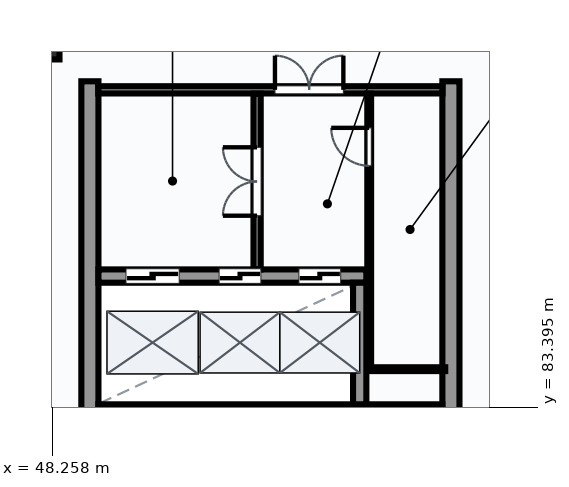
"""IFC4 building model, lengths in metres.
Left out: names, types, materials, properties, quantities, classifications, styles, units other than length and angle.
Written with IfcOpenShell. Run it as: python <this file> out.ifc"""

import sys

from ifc_helpers import new_model, si_unit, direction, frame, frame_2d, origin, origin_2d, place, context, subcontext, project, spatial, rectangle, extrude, element, fill, save


model = new_model("IFC4")
c1 = context("Model", 3, precision=1e-05, world=origin(), true_north=direction((0.0, 1.0)))
c2 = subcontext(c1, "Body", "Model", "MODEL_VIEW")
j1 = project(units=[si_unit("LENGTHUNIT", "METRE"), si_unit("PLANEANGLEUNIT", "RADIAN")], contexts=[c1])
p1 = place(None, origin())
s1 = spatial("IfcSite", under=j1, at=p1, CompositionType="ELEMENT")
p2 = place(p1, origin())
s2 = spatial("IfcBuilding", under=s1, at=p2, CompositionType="ELEMENT")
p3 = place(p2, frame((0.0, 0.0, 24.6)))
s3 = spatial("IfcBuildingStorey", under=s2, at=p3, CompositionType="ELEMENT", Elevation=24.6)
p4 = place(p3, frame((48.0, 93.0, 0.0), z_axis=(0.0, 0.0, 1.0), x_axis=(1.0, 0.0, 0.0)))
e1 = element("IfcColumn", 1, at=p4, inside=s3, PredefinedType="COLUMN", context=c2, shape_type="SweptSolid", body=[
    extrude(rectangle(XDim=0.9, YDim=0.9, at=origin_2d()), origin(), (0.0, 0.0, 1.0), 4.8),
])
for number, where, z_axis, x_axis in (
    (2, (49.25, 83.025, 0.0), (0.0, 0.0, 1.0), (0.0, 1.0, 0.0)),
    (3, (58.75, 83.025, 0.0), (0.0, 0.0, 1.0), (0.0, 1.0, 0.0)),
):
    element("IfcWall", number, at=place(p3, frame(where, z_axis=z_axis, x_axis=x_axis)), inside=s3, PredefinedType="SHEAR", context=c2, shape_type="SweptSolid", body=[
        extrude(rectangle(XDim=8.95, YDim=0.45, at=frame_2d((4.475, 0.0))), origin(), (0.0, 0.0, 1.0), 4.8),
    ])
p5 = place(p3, frame((49.475, 83.25, 0.0), z_axis=(0.0, 0.0, 1.0), x_axis=(1.0, 0.0, 0.0)))
e4 = element("IfcWall", 4, at=p5, inside=s3, PredefinedType="SHEAR", context=c2, shape_type="SweptSolid", body=[
    extrude(rectangle(XDim=9.05, YDim=0.45, at=frame_2d((4.525, 0.0))), origin(), (0.0, 0.0, 1.0), 4.8),
])
p6 = place(p3, frame((49.475, 86.85, 0.0), z_axis=(0.0, 0.0, 1.0), x_axis=(1.0, 0.0, 0.0)))
e5 = element("IfcWall", 5, at=p6, inside=s3, PredefinedType="SHEAR", context=c2, shape_type="SweptSolid", body=[
    extrude(rectangle(XDim=7.05, YDim=0.35, at=frame_2d((3.525, 0.0))), origin(), (0.0, 0.0, 1.0), 4.8),
])
p7 = place(p6, frame((0.725, 0.0, 0.0)))
e6 = element("IfcOpeningElement", 6, at=p7, cuts=e5, PredefinedType="OPENING", context=c2, shape_type="SweptSolid", body=[
    extrude(rectangle(XDim=1.4, YDim=2.3, at=frame_2d((0.7, 1.15))), frame((0.0, 0.185, 0.0), z_axis=(0.0, -1.0, 0.0), x_axis=(1.0, 0.0, 0.0)), (0.0, 0.0, 1.0), 0.37),
])
p8 = place(p6, frame((3.175, 0.0, 0.0)))
e7 = element("IfcOpeningElement", 7, at=p8, cuts=e5, PredefinedType="OPENING", context=c2, shape_type="SweptSolid", body=[
    extrude(rectangle(XDim=1.1, YDim=2.2, at=frame_2d((0.55, 1.1))), frame((0.0, 0.185, 0.0), z_axis=(0.0, -1.0, 0.0), x_axis=(1.0, 0.0, 0.0)), (0.0, 0.0, 1.0), 0.37),
])
p9 = place(p6, frame((5.275, 0.0, 0.0)))
e8 = element("IfcOpeningElement", 8, at=p9, cuts=e5, PredefinedType="OPENING", context=c2, shape_type="SweptSolid", body=[
    extrude(rectangle(XDim=1.1, YDim=2.2, at=frame_2d((0.55, 1.1))), frame((0.0, 0.185, 0.0), z_axis=(0.0, -1.0, 0.0), x_axis=(1.0, 0.0, 0.0)), (0.0, 0.0, 1.0), 0.37),
])
p10 = place(p3, frame((56.35, 83.475, 0.0), z_axis=(0.0, 0.0, 1.0), x_axis=(0.0, 1.0, 0.0)))
e9 = element("IfcWall", 9, at=p10, inside=s3, PredefinedType="SHEAR", context=c2, shape_type="SweptSolid", body=[
    extrude(rectangle(XDim=3.2, YDim=0.35, at=frame_2d((1.6, 0.0))), origin(), (0.0, 0.0, 1.0), 4.8),
])
p11 = place(p3, frame((49.47, 91.75, 0.0), z_axis=(0.0, 0.0, 1.0), x_axis=(1.0, 0.0, 0.0)))
e10 = element("IfcWall", 10, at=p11, inside=s3, PredefinedType="PARTITIONING", context=c2, shape_type="SweptSolid", body=[
    extrude(rectangle(XDim=9.06, YDim=0.19, at=frame_2d((4.53, 0.0))), origin(), (0.0, 0.0, 1.0), 4.58),
])
p12 = place(p11, frame((4.65, 0.0, 0.0)))
e11 = element("IfcOpeningElement", 11, at=p12, cuts=e10, PredefinedType="OPENING", context=c2, shape_type="SweptSolid", body=[
    extrude(rectangle(XDim=1.8, YDim=2.3, at=frame_2d((0.9, 1.15))), frame((0.0, 0.105, 0.0), z_axis=(0.0, -1.0, 0.0), x_axis=(1.0, 0.0, 0.0)), (0.0, 0.0, 1.0), 0.21),
])
p13 = place(p3, frame((53.65, 87.025, 0.0), z_axis=(0.0, 0.0, 1.0), x_axis=(0.0, 1.0, 0.0)))
e12 = element("IfcWall", 12, at=p13, inside=s3, PredefinedType="PARTITIONING", context=c2, shape_type="SweptSolid", body=[
    extrude(rectangle(XDim=4.625, YDim=0.19, at=frame_2d((2.312, 0.0))), origin(), (0.0, 0.0, 1.0), 4.58),
])
p14 = place(p13, frame((1.413, 0.0, 0.0)))
e13 = element("IfcOpeningElement", 13, at=p14, cuts=e12, PredefinedType="OPENING", context=c2, shape_type="SweptSolid", body=[
    extrude(rectangle(XDim=1.8, YDim=2.2, at=frame_2d((0.9, 1.1))), frame((0.0, 0.105, 0.0), z_axis=(0.0, -1.0, 0.0), x_axis=(1.0, 0.0, 0.0)), (0.0, 0.0, 1.0), 0.21),
])
p15 = place(p3, frame((56.6, 84.4, 0.0), z_axis=(0.0, 0.0, 1.0), x_axis=(0.0, 1.0, 0.0)))
e14 = element("IfcWall", 14, at=p15, inside=s3, PredefinedType="PARTITIONING", context=c2, shape_type="SweptSolid", body=[
    extrude(rectangle(XDim=7.25, YDim=0.1, at=frame_2d((3.625, 0.0))), origin(), (0.0, 0.0, 1.0), 4.58),
])
p16 = place(p15, frame((5.35, 0.0, 0.0)))
e15 = element("IfcOpeningElement", 15, at=p16, cuts=e14, PredefinedType="OPENING", context=c2, shape_type="SweptSolid", body=[
    extrude(rectangle(XDim=1.0, YDim=2.1, at=frame_2d((0.5, 1.05))), frame((0.0, 0.06, 0.0), z_axis=(0.0, -1.0, 0.0), x_axis=(1.0, 0.0, 0.0)), (0.0, 0.0, 1.0), 0.12),
])
p17 = place(p3, frame((56.6, 84.4, 0.0), z_axis=(0.0, 0.0, 1.0), x_axis=(1.0, 0.0, 0.0)))
e16 = element("IfcWall", 16, at=p17, inside=s3, PredefinedType="PARTITIONING", context=c2, shape_type="SweptSolid", body=[
    extrude(rectangle(XDim=2.0, YDim=0.1, at=frame_2d((1.0, 0.0))), origin(), (0.0, 0.0, 1.0), 4.58),
])
p18 = place(p7, origin())
e17 = element("IfcDoor", 17, at=p18, inside=s3, OperationType="SLIDING_TO_LEFT", PredefinedType="DOOR", context=c2, shape_type="SweptSolid", body=[
    extrude(rectangle(XDim=1.4, YDim=2.3, at=frame_2d((0.7, 1.15))), frame((0.0, 0.025, 0.0), z_axis=(0.0, -1.0, 0.0), x_axis=(1.0, 0.0, 0.0)), (0.0, 0.0, 1.0), 0.05),
])
fill(e6, e17)
p19 = place(p8, origin())
e18 = element("IfcDoor", 18, at=p19, inside=s3, OperationType="SLIDING_TO_LEFT", PredefinedType="DOOR", context=c2, shape_type="SweptSolid", body=[
    extrude(rectangle(XDim=1.1, YDim=2.2, at=frame_2d((0.55, 1.1))), frame((0.0, 0.025, 0.0), z_axis=(0.0, -1.0, 0.0), x_axis=(1.0, 0.0, 0.0)), (0.0, 0.0, 1.0), 0.05),
])
fill(e7, e18)
p20 = place(p9, origin())
e19 = element("IfcDoor", 19, at=p20, inside=s3, OperationType="SLIDING_TO_LEFT", PredefinedType="DOOR", context=c2, shape_type="SweptSolid", body=[
    extrude(rectangle(XDim=1.1, YDim=2.2, at=frame_2d((0.55, 1.1))), frame((0.0, 0.025, 0.0), z_axis=(0.0, -1.0, 0.0), x_axis=(1.0, 0.0, 0.0)), (0.0, 0.0, 1.0), 0.05),
])
fill(e8, e19)
p21 = place(p12, origin())
e20 = element("IfcDoor", 20, at=p21, inside=s3, OperationType="DOUBLE_DOOR_SINGLE_SWING", PredefinedType="DOOR", context=c2, shape_type="SweptSolid", body=[
    extrude(rectangle(XDim=1.8, YDim=2.3, at=frame_2d((0.9, 1.15))), frame((0.0, 0.025, 0.0), z_axis=(0.0, -1.0, 0.0), x_axis=(1.0, 0.0, 0.0)), (0.0, 0.0, 1.0), 0.05),
])
fill(e11, e20)
p22 = place(p14, origin())
e21 = element("IfcDoor", 21, at=p22, inside=s3, OperationType="DOUBLE_DOOR_SINGLE_SWING", PredefinedType="DOOR", context=c2, shape_type="SweptSolid", body=[
    extrude(rectangle(XDim=1.8, YDim=2.2, at=frame_2d((0.9, 1.1))), frame((0.0, 0.025, 0.0), z_axis=(0.0, -1.0, 0.0), x_axis=(1.0, 0.0, 0.0)), (0.0, 0.0, 1.0), 0.05),
])
fill(e13, e21)
p23 = place(p16, origin())
e22 = element("IfcDoor", 22, at=p23, inside=s3, OperationType="SINGLE_SWING_RIGHT", PredefinedType="DOOR", context=c2, shape_type="SweptSolid", body=[
    extrude(rectangle(XDim=1.0, YDim=2.1, at=frame_2d((0.5, 1.05))), frame((0.0, 0.025, 0.0), z_axis=(0.0, -1.0, 0.0), x_axis=(1.0, 0.0, 0.0)), (0.0, 0.0, 1.0), 0.05),
])
fill(e15, e22)
save(model, sys.argv[1])
